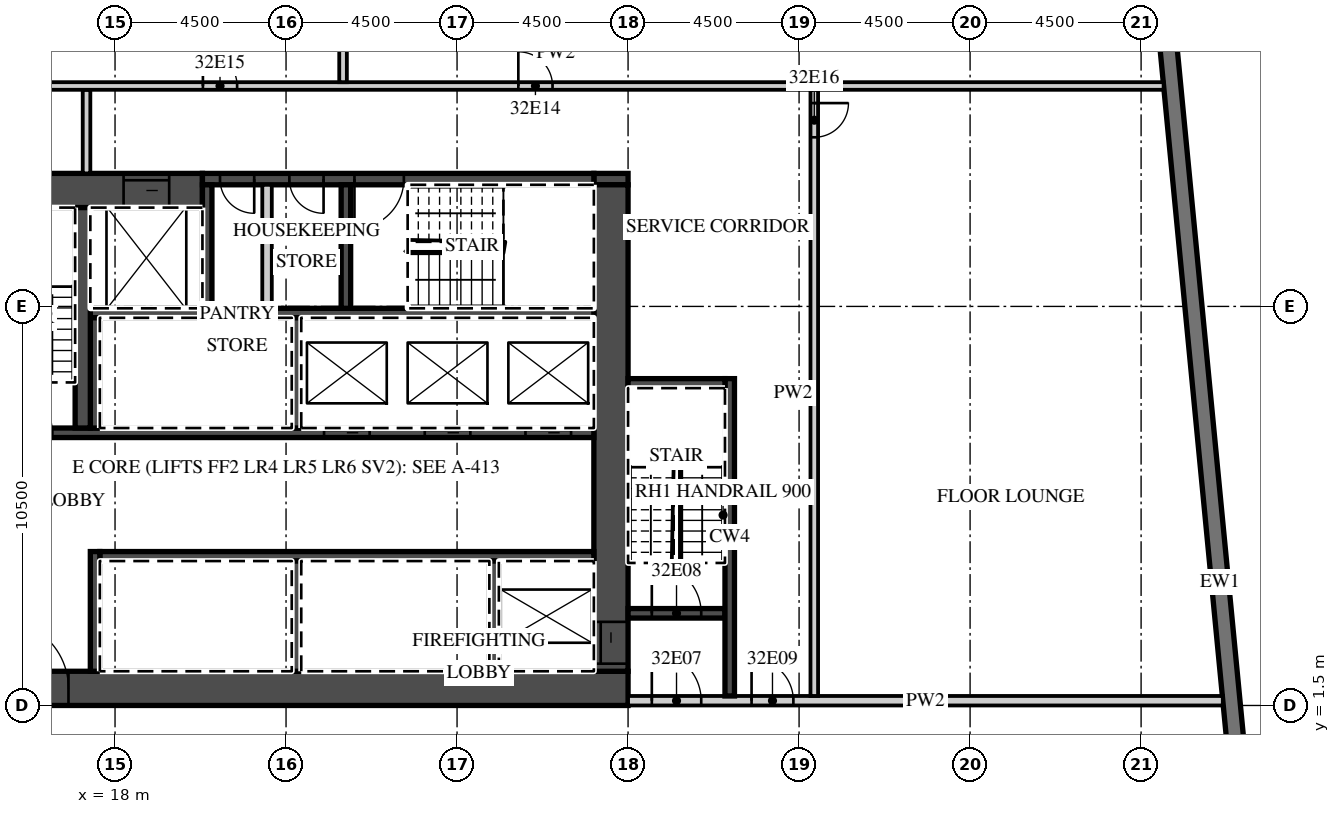
"""IFC4 building model, lengths in metres.
Left out: names, types, materials, properties, quantities, classifications, styles, units other than length and angle.
Written with IfcOpenShell. Run it as: python <this file> out.ifc"""

import sys

from ifc_helpers import new_model, si_unit, direction, frame, frame_2d, origin, place, context, subcontext, project, spatial, rectangle, extrude, element, fill, save


model = new_model("IFC4")
c1 = context("Model", 3, precision=1e-05, world=origin(), true_north=direction((0.0, 1.0)))
c2 = subcontext(c1, "Body", "Model", "MODEL_VIEW")
j1 = project(units=[si_unit("LENGTHUNIT", "METRE"), si_unit("PLANEANGLEUNIT", "RADIAN")], contexts=[c1])
p1 = place(None, origin())
s1 = spatial("IfcSite", under=j1, at=p1, CompositionType="ELEMENT")
p2 = place(p1, origin())
s2 = spatial("IfcBuilding", under=s1, at=p2, CompositionType="ELEMENT")
p3 = place(p2, frame((0.0, 0.0, 140.5)))
s3 = spatial("IfcBuildingStorey", under=s2, at=p3, CompositionType="ELEMENT", Elevation=140.5)
p4 = place(p3, frame((48.753, -12.672, 0.0), z_axis=(0.0, 0.0, 1.0), x_axis=(-0.095842661909, 0.995396495954, 0.0)))
e1 = element("IfcWall", 1, at=p4, inside=s3, PredefinedType="SOLIDWALL", context=c2, shape_type="SweptSolid", body=[
    extrude(rectangle(XDim=35.0, YDim=0.45, at=frame_2d((17.5, 0.0))), origin(), (0.0, 0.0, 1.0), 3.02),
])
p5 = place(p4, frame((3.072, 0.0, 0.45)))
e2 = element("IfcOpeningElement", 2, at=p5, cuts=e1, PredefinedType="OPENING", context=c2, shape_type="SweptSolid", body=[
    extrude(rectangle(XDim=3.3, YDim=2.25, at=frame_2d((1.65, 1.125))), frame((0.0, 0.235, 0.0), z_axis=(0.0, -1.0, 0.0), x_axis=(1.0, 0.0, 0.0)), (0.0, 0.0, 1.0), 0.47),
])
p6 = place(p4, frame((7.593, 0.0, 0.45)))
e3 = element("IfcOpeningElement", 3, at=p6, cuts=e1, PredefinedType="OPENING", context=c2, shape_type="SweptSolid", body=[
    extrude(rectangle(XDim=3.3, YDim=2.25, at=frame_2d((1.65, 1.125))), frame((0.0, 0.235, 0.0), z_axis=(0.0, -1.0, 0.0), x_axis=(1.0, 0.0, 0.0)), (0.0, 0.0, 1.0), 0.47),
])
p7 = place(p3, frame((13.5, 1.95, 0.0), z_axis=(0.0, 0.0, 1.0), x_axis=(1.0, 0.0, 0.0)))
e4 = element("IfcWall", 4, at=p7, inside=s3, PredefinedType="SHEAR", context=c2, shape_type="SweptSolid", body=[
    extrude(rectangle(XDim=18.0, YDim=0.9, at=frame_2d((9.0, 0.0))), origin(), (0.0, 0.0, 1.0), 3.02),
])
p8 = place(p7, frame((1.475, 0.0, 0.0)))
e5 = element("IfcOpeningElement", 5, at=p8, cuts=e4, PredefinedType="OPENING", context=c2, shape_type="SweptSolid", body=[
    extrude(rectangle(XDim=1.8, YDim=2.1, at=frame_2d((0.9, 1.05))), frame((0.0, 0.46, 0.0), z_axis=(0.0, -1.0, 0.0), x_axis=(1.0, 0.0, 0.0)), (0.0, 0.0, 1.0), 0.92),
])
p9 = place(p3, frame((13.5, 15.05, 0.0), z_axis=(0.0, 0.0, 1.0), x_axis=(1.0, 0.0, 0.0)))
e6 = element("IfcWall", 6, at=p9, inside=s3, PredefinedType="SHEAR", context=c2, shape_type="SweptSolid", body=[
    extrude(rectangle(XDim=6.8, YDim=0.9, at=frame_2d((3.4, 0.0))), origin(), (0.0, 0.0, 1.0), 3.02),
])
p10 = place(p9, frame((4.725, 0.0, 0.0)))
e7 = element("IfcOpeningElement", 7, at=p10, cuts=e6, PredefinedType="OPENING", context=c2, shape_type="SweptSolid", body=[
    extrude(rectangle(XDim=1.2, YDim=2.1, at=frame_2d((0.6, 1.05))), frame((0.0, 0.46, 0.0), z_axis=(0.0, -1.0, 0.0), x_axis=(1.0, 0.0, 0.0)), (0.0, 0.0, 1.0), 0.92),
])
p11 = place(p3, frame((30.6, 15.35, 0.0), z_axis=(0.0, 0.0, 1.0), x_axis=(1.0, 0.0, 0.0)))
e8 = element("IfcWall", 8, at=p11, inside=s3, PredefinedType="SHEAR", context=c2, shape_type="SweptSolid", body=[
    extrude(rectangle(XDim=0.9, YDim=0.3, at=frame_2d((0.45, 0.0))), origin(), (0.0, 0.0, 1.0), 3.02),
])
p12 = place(p3, frame((20.3, 15.35, 0.0), z_axis=(0.0, 0.0, 1.0), x_axis=(1.0, 0.0, 0.0)))
e9 = element("IfcWall", 9, at=p12, inside=s3, PredefinedType="SHEAR", context=c2, shape_type="SweptSolid", body=[
    extrude(rectangle(XDim=10.3, YDim=0.3, at=frame_2d((5.15, 0.0))), origin(), (0.0, 0.0, 1.0), 3.02),
])
p13 = place(p12, frame((4.0, 0.0, 0.0)))
e10 = element("IfcOpeningElement", 10, at=p13, cuts=e9, PredefinedType="OPENING", context=c2, shape_type="SweptSolid", body=[
    extrude(rectangle(XDim=1.3, YDim=2.1, at=frame_2d((0.65, 1.05))), frame((0.0, 0.16, 0.0), z_axis=(0.0, -1.0, 0.0), x_axis=(1.0, 0.0, 0.0)), (0.0, 0.0, 1.0), 0.32),
])
p14 = place(p12, frame((2.288, 0.0, 0.0)))
e11 = element("IfcOpeningElement", 11, at=p14, cuts=e9, PredefinedType="OPENING", context=c2, shape_type="SweptSolid", body=[
    extrude(rectangle(XDim=0.9, YDim=2.1, at=frame_2d((0.45, 1.05))), frame((0.0, 0.16, 0.0), z_axis=(0.0, -1.0, 0.0), x_axis=(1.0, 0.0, 0.0)), (0.0, 0.0, 1.0), 0.32),
])
p15 = place(p12, frame((0.462, 0.0, 0.0)))
e12 = element("IfcOpeningElement", 12, at=p15, cuts=e9, PredefinedType="OPENING", context=c2, shape_type="SweptSolid", body=[
    extrude(rectangle(XDim=0.9, YDim=2.1, at=frame_2d((0.45, 1.05))), frame((0.0, 0.16, 0.0), z_axis=(0.0, -1.0, 0.0), x_axis=(1.0, 0.0, 0.0)), (0.0, 0.0, 1.0), 0.32),
])
p16 = place(p3, frame((31.05, 2.4, 0.0), z_axis=(0.0, 0.0, 1.0), x_axis=(0.0, 1.0, 0.0)))
e13 = element("IfcWall", 13, at=p16, inside=s3, PredefinedType="SHEAR", context=c2, shape_type="SweptSolid", body=[
    extrude(rectangle(XDim=12.8, YDim=0.9, at=frame_2d((6.4, 0.0))), origin(), (0.0, 0.0, 1.0), 3.02),
])
p17 = place(p16, frame((0.2, 0.0, 0.0)))
e14 = element("IfcOpeningElement", 14, at=p17, cuts=e13, PredefinedType="OPENING", context=c2, shape_type="SweptSolid", body=[
    extrude(rectangle(XDim=1.1, YDim=2.1, at=frame_2d((0.55, 1.05))), frame((0.0, 0.46, 0.0), z_axis=(0.0, -1.0, 0.0), x_axis=(1.0, 0.0, 0.0)), (0.0, 0.0, 1.0), 0.92),
])
p18 = place(p3, frame((17.6, 5.425, 0.0), z_axis=(0.0, 0.0, 1.0), x_axis=(1.0, 0.0, 0.0)))
e15 = element("IfcWall", 15, at=p18, inside=s3, PredefinedType="SHEAR", context=c2, shape_type="SweptSolid", body=[
    extrude(rectangle(XDim=13.0, YDim=0.25, at=frame_2d((6.5, 0.0))), origin(), (0.0, 0.0, 1.0), 3.02),
])
p19 = place(p3, frame((17.475, 2.4, 0.0), z_axis=(0.0, 0.0, 1.0), x_axis=(0.0, 1.0, 0.0)))
e16 = element("IfcWall", 16, at=p19, inside=s3, PredefinedType="SHEAR", context=c2, shape_type="SweptSolid", body=[
    extrude(rectangle(XDim=3.15, YDim=0.25, at=frame_2d((1.575, 0.0))), origin(), (0.0, 0.0, 1.0), 3.02),
])
for number, where, z_axis, x_axis in (
    (17, (27.975, 2.4, 0.0), (0.0, 0.0, 1.0), (0.0, 1.0, 0.0)),
    (18, (22.775, 2.4, 0.0), (0.0, 0.0, 1.0), (0.0, 1.0, 0.0)),
):
    element("IfcWall", number, at=place(p3, frame(where, z_axis=z_axis, x_axis=x_axis)), inside=s3, PredefinedType="SHEAR", context=c2, shape_type="SweptSolid", body=[
        extrude(rectangle(XDim=2.9, YDim=0.25, at=frame_2d((1.45, 0.0))), origin(), (0.0, 0.0, 1.0), 3.02),
    ])
p20 = place(p3, frame((14.4, 8.675, 0.0), z_axis=(0.0, 0.0, 1.0), x_axis=(1.0, 0.0, 0.0)))
e19 = element("IfcWall", 19, at=p20, inside=s3, PredefinedType="SHEAR", context=c2, shape_type="SweptSolid", body=[
    extrude(rectangle(XDim=16.2, YDim=0.25, at=frame_2d((8.1, 0.0))), origin(), (0.0, 0.0, 1.0), 3.02),
])
p21 = place(p20, frame((14.4, 0.0, 0.0)))
e20 = element("IfcOpeningElement", 20, at=p21, cuts=e19, PredefinedType="OPENING", context=c2, shape_type="SweptSolid", body=[
    extrude(rectangle(XDim=1.2, YDim=2.1, at=frame_2d((0.6, 1.05))), frame((0.0, 0.135, 0.0), z_axis=(0.0, -1.0, 0.0), x_axis=(1.0, 0.0, 0.0)), (0.0, 0.0, 1.0), 0.27),
])
p22 = place(p20, frame((11.75, 0.0, 0.0)))
e21 = element("IfcOpeningElement", 21, at=p22, cuts=e19, PredefinedType="OPENING", context=c2, shape_type="SweptSolid", body=[
    extrude(rectangle(XDim=1.2, YDim=2.1, at=frame_2d((0.6, 1.05))), frame((0.0, 0.135, 0.0), z_axis=(0.0, -1.0, 0.0), x_axis=(1.0, 0.0, 0.0)), (0.0, 0.0, 1.0), 0.27),
])
p23 = place(p20, frame((9.1, 0.0, 0.0)))
e22 = element("IfcOpeningElement", 22, at=p23, cuts=e19, PredefinedType="OPENING", context=c2, shape_type="SweptSolid", body=[
    extrude(rectangle(XDim=1.2, YDim=2.1, at=frame_2d((0.6, 1.05))), frame((0.0, 0.135, 0.0), z_axis=(0.0, -1.0, 0.0), x_axis=(1.0, 0.0, 0.0)), (0.0, 0.0, 1.0), 0.27),
])
p24 = place(p20, frame((0.65, 0.0, 0.0)))
e23 = element("IfcOpeningElement", 23, at=p24, cuts=e19, PredefinedType="OPENING", context=c2, shape_type="SweptSolid", body=[
    extrude(rectangle(XDim=1.3, YDim=2.1, at=frame_2d((0.65, 1.05))), frame((0.0, 0.135, 0.0), z_axis=(0.0, -1.0, 0.0), x_axis=(1.0, 0.0, 0.0)), (0.0, 0.0, 1.0), 0.27),
])
p25 = place(p3, frame((17.35, 11.825, 0.0), z_axis=(0.0, 0.0, 1.0), x_axis=(1.0, 0.0, 0.0)))
e24 = element("IfcWall", 24, at=p25, inside=s3, PredefinedType="SHEAR", context=c2, shape_type="SweptSolid", body=[
    extrude(rectangle(XDim=13.25, YDim=0.25, at=frame_2d((6.625, 0.0))), origin(), (0.0, 0.0, 1.0), 3.02),
])
for number, where, z_axis, x_axis in (
    (25, (17.475, 8.8, 0.0), (0.0, 0.0, 1.0), (0.0, 1.0, 0.0)),
    (26, (22.775, 8.8, 0.0), (0.0, 0.0, 1.0), (0.0, 1.0, 0.0)),
):
    element("IfcWall", number, at=place(p3, frame(where, z_axis=z_axis, x_axis=x_axis)), inside=s3, PredefinedType="SHEAR", context=c2, shape_type="SweptSolid", body=[
        extrude(rectangle(XDim=2.9, YDim=0.25, at=frame_2d((1.45, 0.0))), origin(), (0.0, 0.0, 1.0), 3.02),
    ])
p26 = place(p3, frame((17.15, 8.8, 0.0), z_axis=(0.0, 0.0, 1.0), x_axis=(0.0, 1.0, 0.0)))
e27 = element("IfcWall", 27, at=p26, inside=s3, PredefinedType="SHEAR", context=c2, shape_type="SweptSolid", body=[
    extrude(rectangle(XDim=5.8, YDim=0.4, at=frame_2d((2.9, 0.0))), origin(), (0.0, 0.0, 1.0), 3.02),
])
for number, where, z_axis, x_axis in (
    (28, (20.425, 11.95, 0.0), (0.0, 0.0, 1.0), (0.0, 1.0, 0.0)),
    (29, (24.075, 11.95, 0.0), (0.0, 0.0, 1.0), (0.0, 1.0, 0.0)),
):
    element("IfcWall", number, at=place(p3, frame(where, z_axis=z_axis, x_axis=x_axis)), inside=s3, PredefinedType="SHEAR", context=c2, shape_type="SweptSolid", body=[
        extrude(rectangle(XDim=3.25, YDim=0.25, at=frame_2d((1.625, 0.0))), origin(), (0.0, 0.0, 1.0), 3.02),
    ])
p27 = place(p3, frame((22.0, 11.95, 0.0), z_axis=(0.0, 0.0, 1.0), x_axis=(0.0, 1.0, 0.0)))
e30 = element("IfcWall", 30, at=p27, inside=s3, PredefinedType="PARTITIONING", context=c2, shape_type="SweptSolid", body=[
    extrude(rectangle(XDim=3.25, YDim=0.25, at=frame_2d((1.625, 0.0))), origin(), (0.0, 0.0, 1.0), 3.02),
])
p28 = place(p3, frame((31.5, 1.625, 0.0), z_axis=(0.0, 0.0, 1.0), x_axis=(1.0, 0.0, 0.0)))
e31 = element("IfcWall", 31, at=p28, inside=s3, PredefinedType="PARTITIONING", context=c2, shape_type="SweptSolid", body=[
    extrude(rectangle(XDim=15.65, YDim=0.25, at=frame_2d((7.825, 0.0))), origin(), (0.0, 0.0, 1.0), 3.02),
])
p29 = place(p28, frame((0.625, 0.0, 0.0)))
e32 = element("IfcOpeningElement", 32, at=p29, cuts=e31, PredefinedType="OPENING", context=c2, shape_type="SweptSolid", body=[
    extrude(rectangle(XDim=1.3, YDim=2.1, at=frame_2d((0.65, 1.05))), frame((0.0, 0.135, 0.0), z_axis=(0.0, -1.0, 0.0), x_axis=(1.0, 0.0, 0.0)), (0.0, 0.0, 1.0), 0.27),
])
p30 = place(p28, frame((3.25, 0.0, 0.0)))
e33 = element("IfcOpeningElement", 33, at=p30, cuts=e31, PredefinedType="OPENING", context=c2, shape_type="SweptSolid", body=[
    extrude(rectangle(XDim=1.1, YDim=2.1, at=frame_2d((0.55, 1.05))), frame((0.0, 0.135, 0.0), z_axis=(0.0, -1.0, 0.0), x_axis=(1.0, 0.0, 0.0)), (0.0, 0.0, 1.0), 0.27),
])
p31 = place(p3, frame((31.5, 3.925, 0.0), z_axis=(0.0, 0.0, 1.0), x_axis=(1.0, 0.0, 0.0)))
e34 = element("IfcWall", 34, at=p31, inside=s3, PredefinedType="SHEAR", context=c2, shape_type="SweptSolid", body=[
    extrude(rectangle(XDim=2.55, YDim=0.25, at=frame_2d((1.275, 0.0))), origin(), (0.0, 0.0, 1.0), 3.02),
])
p32 = place(p31, frame((0.625, 0.0, 0.0)))
e35 = element("IfcOpeningElement", 35, at=p32, cuts=e34, PredefinedType="OPENING", context=c2, shape_type="SweptSolid", body=[
    extrude(rectangle(XDim=1.3, YDim=2.1, at=frame_2d((0.65, 1.05))), frame((0.0, 0.135, 0.0), z_axis=(0.0, -1.0, 0.0), x_axis=(1.0, 0.0, 0.0)), (0.0, 0.0, 1.0), 0.27),
])
p33 = place(p3, frame((34.175, 1.75, 0.0), z_axis=(0.0, 0.0, 1.0), x_axis=(0.0, 1.0, 0.0)))
e36 = element("IfcWall", 36, at=p33, inside=s3, PredefinedType="SHEAR", context=c2, shape_type="SweptSolid", body=[
    extrude(rectangle(XDim=8.35, YDim=0.25, at=frame_2d((4.175, 0.0))), origin(), (0.0, 0.0, 1.0), 3.02),
])
p34 = place(p3, frame((31.5, 9.975, 0.0), z_axis=(0.0, 0.0, 1.0), x_axis=(1.0, 0.0, 0.0)))
e37 = element("IfcWall", 37, at=p34, inside=s3, PredefinedType="SHEAR", context=c2, shape_type="SweptSolid", body=[
    extrude(rectangle(XDim=2.55, YDim=0.25, at=frame_2d((1.275, 0.0))), origin(), (0.0, 0.0, 1.0), 3.02),
])
p35 = place(p3, frame((17.25, 15.5, 0.0), z_axis=(0.0, 0.0, 1.0), x_axis=(0.0, 1.0, 0.0)))
e38 = element("IfcWall", 38, at=p35, inside=s3, PredefinedType="PARTITIONING", context=c2, shape_type="SweptSolid", body=[
    extrude(rectangle(XDim=2.2, YDim=0.2, at=frame_2d((1.1, 0.0))), origin(), (0.0, 0.0, 1.0), 3.02),
])
p36 = place(p3, frame((36.4, 1.75, 0.0), z_axis=(0.0, 0.0, 1.0), x_axis=(0.0, 1.0, 0.0)))
e39 = element("IfcWall", 39, at=p36, inside=s3, PredefinedType="PARTITIONING", context=c2, shape_type="SweptSolid", body=[
    extrude(rectangle(XDim=15.95, YDim=0.2, at=frame_2d((7.975, 0.0))), origin(), (0.0, 0.0, 1.0), 3.02),
])
p37 = place(p36, frame((14.7, 0.0, 0.0)))
e40 = element("IfcOpeningElement", 40, at=p37, cuts=e39, PredefinedType="OPENING", context=c2, shape_type="SweptSolid", body=[
    extrude(rectangle(XDim=0.9, YDim=2.1, at=frame_2d((0.45, 1.05))), frame((0.0, 0.11, 0.0), z_axis=(0.0, -1.0, 0.0), x_axis=(1.0, 0.0, 0.0)), (0.0, 0.0, 1.0), 0.22),
])
p38 = place(p3, frame((13.6, 17.8, 0.0), z_axis=(0.0, 0.0, 1.0), x_axis=(1.0, 0.0, 0.0)))
e41 = element("IfcWall", 41, at=p38, inside=s3, PredefinedType="PARTITIONING", context=c2, shape_type="SweptSolid", body=[
    extrude(rectangle(XDim=31.993, YDim=0.2, at=frame_2d((15.997, 0.0))), origin(), (0.0, 0.0, 1.0), 3.02),
])
p39 = place(p38, frame((15.012, 0.0, 0.0)))
e42 = element("IfcOpeningElement", 42, at=p39, cuts=e41, PredefinedType="OPENING", context=c2, shape_type="SweptSolid", body=[
    extrude(rectangle(XDim=0.9, YDim=2.1, at=frame_2d((0.45, 1.05))), frame((0.0, 0.11, 0.0), z_axis=(0.0, -1.0, 0.0), x_axis=(1.0, 0.0, 0.0)), (0.0, 0.0, 1.0), 0.22),
])
p40 = place(p38, frame((6.712, 0.0, 0.0)))
e43 = element("IfcOpeningElement", 43, at=p40, cuts=e41, PredefinedType="OPENING", context=c2, shape_type="SweptSolid", body=[
    extrude(rectangle(XDim=0.9, YDim=2.1, at=frame_2d((0.45, 1.05))), frame((0.0, 0.11, 0.0), z_axis=(0.0, -1.0, 0.0), x_axis=(1.0, 0.0, 0.0)), (0.0, 0.0, 1.0), 0.22),
])
p41 = place(p3, frame((24.0, 17.9, 0.0), z_axis=(0.0, 0.0, 1.0), x_axis=(0.0, 1.0, 0.0)))
e44 = element("IfcWall", 44, at=p41, inside=s3, PredefinedType="PARTITIONING", context=c2, shape_type="SweptSolid", body=[
    extrude(rectangle(XDim=5.774, YDim=0.2, at=frame_2d((2.887, 0.0))), origin(), (0.0, 0.0, 1.0), 3.02),
])
p42 = place(p21, origin())
e45 = element("IfcDoor", 45, at=p42, inside=s3, OperationType="SLIDING_TO_LEFT", PredefinedType="DOOR", context=c2, shape_type="SweptSolid", body=[
    extrude(rectangle(XDim=1.2, YDim=2.1, at=frame_2d((0.6, 1.05))), frame((0.0, 0.025, 0.0), z_axis=(0.0, -1.0, 0.0), x_axis=(1.0, 0.0, 0.0)), (0.0, 0.0, 1.0), 0.05),
])
fill(e20, e45)
p43 = place(p22, origin())
e46 = element("IfcDoor", 46, at=p43, inside=s3, OperationType="SLIDING_TO_RIGHT", PredefinedType="DOOR", context=c2, shape_type="SweptSolid", body=[
    extrude(rectangle(XDim=1.2, YDim=2.1, at=frame_2d((0.6, 1.05))), frame((0.0, 0.025, 0.0), z_axis=(0.0, -1.0, 0.0), x_axis=(1.0, 0.0, 0.0)), (0.0, 0.0, 1.0), 0.05),
])
fill(e21, e46)
p44 = place(p23, origin())
e47 = element("IfcDoor", 47, at=p44, inside=s3, OperationType="SLIDING_TO_RIGHT", PredefinedType="DOOR", context=c2, shape_type="SweptSolid", body=[
    extrude(rectangle(XDim=1.2, YDim=2.1, at=frame_2d((0.6, 1.05))), frame((0.0, 0.025, 0.0), z_axis=(0.0, -1.0, 0.0), x_axis=(1.0, 0.0, 0.0)), (0.0, 0.0, 1.0), 0.05),
])
fill(e22, e47)
p45 = place(p10, origin())
e48 = element("IfcDoor", 48, at=p45, inside=s3, OperationType="SLIDING_TO_LEFT", PredefinedType="DOOR", context=c2, shape_type="SweptSolid", body=[
    extrude(rectangle(XDim=1.2, YDim=2.1, at=frame_2d((0.6, 1.05))), frame((0.0, 0.025, 0.0), z_axis=(0.0, -1.0, 0.0), x_axis=(1.0, 0.0, 0.0)), (0.0, 0.0, 1.0), 0.05),
])
fill(e7, e48)
p46 = place(p17, origin())
e49 = element("IfcDoor", 49, at=p46, inside=s3, OperationType="SLIDING_TO_LEFT", PredefinedType="DOOR", context=c2, shape_type="SweptSolid", body=[
    extrude(rectangle(XDim=1.1, YDim=2.1, at=frame_2d((0.55, 1.05))), frame((0.0, 0.025, 0.0), z_axis=(0.0, -1.0, 0.0), x_axis=(1.0, 0.0, 0.0)), (0.0, 0.0, 1.0), 0.05),
])
fill(e14, e49)
p47 = place(p8, origin())
e50 = element("IfcDoor", 50, at=p47, inside=s3, OperationType="DOUBLE_DOOR_DOUBLE_SWING", PredefinedType="DOOR", context=c2, shape_type="SweptSolid", body=[
    extrude(rectangle(XDim=1.8, YDim=2.1, at=frame_2d((0.9, 1.05))), frame((0.0, 0.025, 0.0), z_axis=(0.0, -1.0, 0.0), x_axis=(1.0, 0.0, 0.0)), (0.0, 0.0, 1.0), 0.05),
])
fill(e5, e50)
p48 = place(p29, origin())
e51 = element("IfcDoor", 51, at=p48, inside=s3, OperationType="SINGLE_SWING_LEFT", PredefinedType="DOOR", context=c2, shape_type="SweptSolid", body=[
    extrude(rectangle(XDim=1.3, YDim=2.1, at=frame_2d((0.65, 1.05))), frame((0.0, 0.025, 0.0), z_axis=(0.0, -1.0, 0.0), x_axis=(1.0, 0.0, 0.0)), (0.0, 0.0, 1.0), 0.05),
])
fill(e32, e51)
p49 = place(p32, origin())
e52 = element("IfcDoor", 52, at=p49, inside=s3, OperationType="SINGLE_SWING_LEFT", PredefinedType="DOOR", context=c2, shape_type="SweptSolid", body=[
    extrude(rectangle(XDim=1.3, YDim=2.1, at=frame_2d((0.65, 1.05))), frame((0.0, 0.025, 0.0), z_axis=(0.0, -1.0, 0.0), x_axis=(1.0, 0.0, 0.0)), (0.0, 0.0, 1.0), 0.05),
])
fill(e35, e52)
p50 = place(p30, origin())
e53 = element("IfcDoor", 53, at=p50, inside=s3, OperationType="SINGLE_SWING_LEFT", PredefinedType="DOOR", context=c2, shape_type="SweptSolid", body=[
    extrude(rectangle(XDim=1.1, YDim=2.1, at=frame_2d((0.55, 1.05))), frame((0.0, 0.025, 0.0), z_axis=(0.0, -1.0, 0.0), x_axis=(1.0, 0.0, 0.0)), (0.0, 0.0, 1.0), 0.05),
])
fill(e33, e53)
p51 = place(p13, origin())
e54 = element("IfcDoor", 54, at=p51, inside=s3, OperationType="SINGLE_SWING_LEFT", PredefinedType="DOOR", context=c2, shape_type="SweptSolid", body=[
    extrude(rectangle(XDim=1.3, YDim=2.1, at=frame_2d((0.65, 1.05))), frame((0.0, 0.025, 0.0), z_axis=(0.0, -1.0, 0.0), x_axis=(1.0, 0.0, 0.0)), (0.0, 0.0, 1.0), 0.05),
])
fill(e10, e54)
p52 = place(p14, origin())
e55 = element("IfcDoor", 55, at=p52, inside=s3, OperationType="SINGLE_SWING_RIGHT", PredefinedType="DOOR", context=c2, shape_type="SweptSolid", body=[
    extrude(rectangle(XDim=0.9, YDim=2.1, at=frame_2d((0.45, 1.05))), frame((0.0, 0.025, 0.0), z_axis=(0.0, -1.0, 0.0), x_axis=(1.0, 0.0, 0.0)), (0.0, 0.0, 1.0), 0.05),
])
fill(e11, e55)
p53 = place(p15, origin())
e56 = element("IfcDoor", 56, at=p53, inside=s3, OperationType="SINGLE_SWING_RIGHT", PredefinedType="DOOR", context=c2, shape_type="SweptSolid", body=[
    extrude(rectangle(XDim=0.9, YDim=2.1, at=frame_2d((0.45, 1.05))), frame((0.0, 0.025, 0.0), z_axis=(0.0, -1.0, 0.0), x_axis=(1.0, 0.0, 0.0)), (0.0, 0.0, 1.0), 0.05),
])
fill(e12, e56)
p54 = place(p39, origin())
e57 = element("IfcDoor", 57, at=p54, inside=s3, OperationType="SINGLE_SWING_LEFT", PredefinedType="DOOR", context=c2, shape_type="SweptSolid", body=[
    extrude(rectangle(XDim=0.9, YDim=2.1, at=frame_2d((0.45, 1.05))), frame((0.0, 0.025, 0.0), z_axis=(0.0, -1.0, 0.0), x_axis=(1.0, 0.0, 0.0)), (0.0, 0.0, 1.0), 0.05),
])
fill(e42, e57)
p55 = place(p40, origin())
e58 = element("IfcDoor", 58, at=p55, inside=s3, OperationType="SINGLE_SWING_LEFT", PredefinedType="DOOR", context=c2, shape_type="SweptSolid", body=[
    extrude(rectangle(XDim=0.9, YDim=2.1, at=frame_2d((0.45, 1.05))), frame((0.0, 0.025, 0.0), z_axis=(0.0, -1.0, 0.0), x_axis=(1.0, 0.0, 0.0)), (0.0, 0.0, 1.0), 0.05),
])
fill(e43, e58)
p56 = place(p37, origin())
e59 = element("IfcDoor", 59, at=p56, inside=s3, OperationType="SINGLE_SWING_RIGHT", PredefinedType="DOOR", context=c2, shape_type="SweptSolid", body=[
    extrude(rectangle(XDim=0.9, YDim=2.1, at=frame_2d((0.45, 1.05))), frame((0.0, 0.025, 0.0), z_axis=(0.0, -1.0, 0.0), x_axis=(1.0, 0.0, 0.0)), (0.0, 0.0, 1.0), 0.05),
])
fill(e40, e59)
save(model, sys.argv[1])
